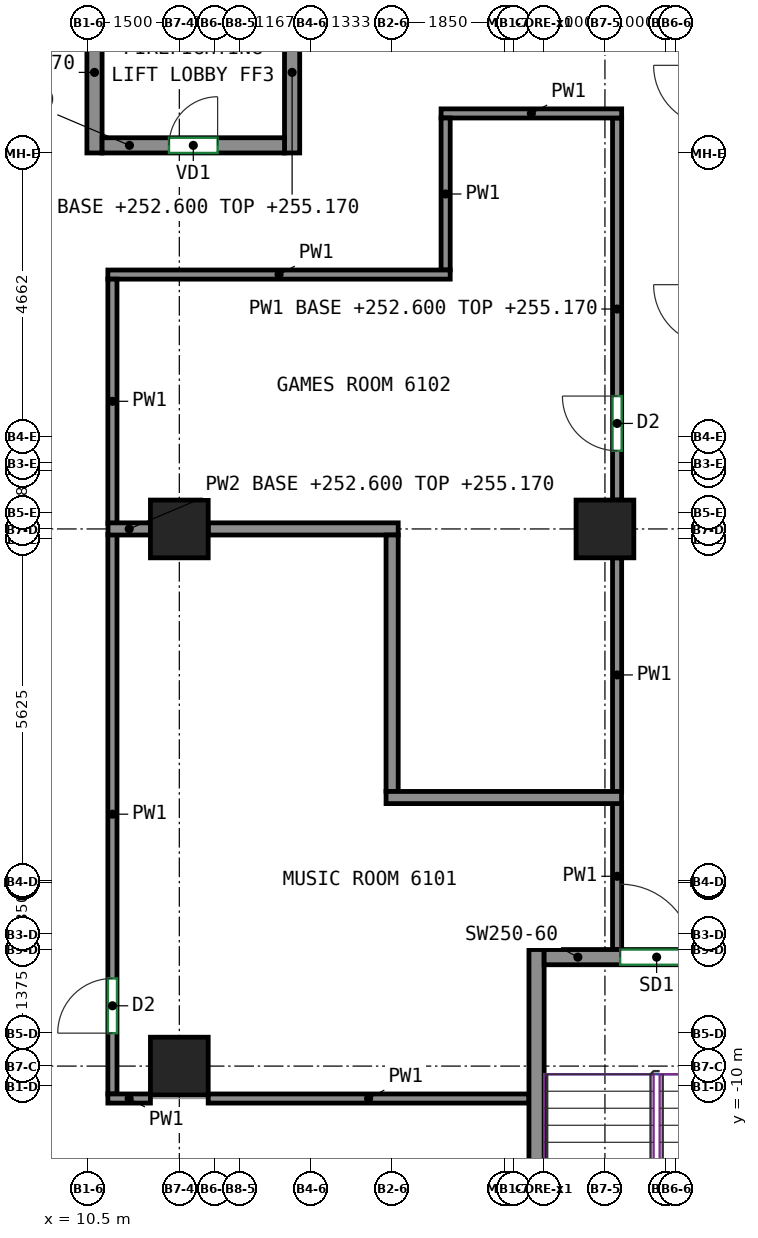
"""IFC4 building model, lengths in metres.
Left out: names, types, materials, properties, quantities, classifications, styles, units other than length and angle.
Written with IfcOpenShell. Run it as: python <this file> out.ifc"""

import sys

from ifc_helpers import new_model, si_unit, direction, frame, frame_2d, origin, origin_2d, place, context, subcontext, project, spatial, rectangle, extrude, source, transform, mapped, element, fill, save


model = new_model("IFC4")
c1 = context("Model", 3, precision=1e-05, world=origin(), true_north=direction((0.0, 1.0)))
c2 = subcontext(c1, "Body", "Model", "MODEL_VIEW")
j1 = project(units=[si_unit("LENGTHUNIT", "METRE"), si_unit("PLANEANGLEUNIT", "RADIAN")], contexts=[c1])
p1 = place(None, origin())
s1 = spatial("IfcSite", under=j1, at=p1, CompositionType="ELEMENT")
p2 = place(p1, origin())
s2 = spatial("IfcBuilding", under=s1, at=p2, CompositionType="ELEMENT")
p3 = place(p2, frame((0.0, 0.0, 252.6)))
s3 = spatial("IfcBuildingStorey", under=s2, at=p3, CompositionType="ELEMENT", Elevation=252.6)
m1 = source(origin(), c2, "Body", "SweptSolid", [
    extrude(rectangle(XDim=0.95, YDim=0.95, at=origin_2d()), origin(), (0.0, 0.0, 1.0), 3.12),
])
for number, where, z_axis, x_axis in (
    (1, (12.0, -9.667, 0.0), (0.0, 0.0, 1.0), (1.0, 0.0, 0.0)),
    (2, (12.0, -0.833, 0.0), (0.0, 0.0, 1.0), (1.0, 0.0, 0.0)),
    (3, (19.0, -0.833, 0.0), (0.0, 0.0, 1.0), (1.0, 0.0, 0.0)),
):
    element("IfcColumn", number, at=place(p3, frame(where, z_axis=z_axis, x_axis=x_axis)), inside=s3, PredefinedType="COLUMN", context=c2, shape_type="MappedRepresentation", body=[
        mapped(m1, transform((0.0, 0.0, 0.0))),
    ])
m2 = source(origin(), c2, "Body", "SweptSolid", [
    extrude(rectangle(XDim=8.0, YDim=0.25, at=frame_2d((4.0, 0.0))), origin(), (0.0, 0.0, 1.0), 3.12),
])
p4 = place(p3, frame((17.875, -15.75, 0.0), z_axis=(0.0, 0.0, 1.0), x_axis=(0.0, 1.0, 0.0)))
e4 = element("IfcWall", 4, at=p4, inside=s3, PredefinedType="SHEAR", context=c2, shape_type="MappedRepresentation", body=[
    mapped(m2, transform((0.0, 0.0, 0.0))),
])
m3 = source(origin(), c2, "Body", "SweptSolid", [
    extrude(rectangle(XDim=3.7, YDim=0.25, at=frame_2d((1.85, 0.0))), origin(), (0.0, 0.0, 1.0), 3.12),
])
p5 = place(p3, frame((18.0, -7.875, 0.0), z_axis=(0.0, 0.0, 1.0), x_axis=(1.0, 0.0, 0.0)))
e5 = element("IfcWall", 5, at=p5, inside=s3, PredefinedType="SHEAR", context=c2, shape_type="MappedRepresentation", body=[
    mapped(m3, transform((0.0, 0.0, 0.0))),
])
p6 = place(p5, frame((1.25, 0.0, 0.0)))
e6 = element("IfcOpeningElement", 6, at=p6, cuts=e5, PredefinedType="OPENING", context=c2, shape_type="SweptSolid", body=[
    extrude(rectangle(XDim=1.2, YDim=2.1, at=frame_2d((0.6, 1.05))), frame((0.0, 0.135, 0.0), z_axis=(0.0, -1.0, 0.0), x_axis=(1.0, 0.0, 0.0)), (0.0, 0.0, 1.0), 0.27),
])
m4 = source(origin(), c2, "Body", "SweptSolid", [
    extrude(rectangle(XDim=2.65, YDim=0.25, at=frame_2d((1.325, 0.0))), origin(), (0.0, 0.0, 1.0), 2.57),
])
for number, where, z_axis, x_axis in (
    (7, (10.605, 5.35, 0.0), (0.0, 0.0, 1.0), (0.0, 1.0, 0.0)),
    (8, (13.855, 5.35, 0.0), (0.0, 0.0, 1.0), (0.0, 1.0, 0.0)),
):
    element("IfcWall", number, at=place(p3, frame(where, z_axis=z_axis, x_axis=x_axis)), inside=s3, PredefinedType="PARTITIONING", context=c2, shape_type="MappedRepresentation", body=[
        mapped(m4, transform((0.0, 0.0, 0.0))),
    ])
m5 = source(origin(), c2, "Body", "SweptSolid", [
    extrude(rectangle(XDim=3.0, YDim=0.25, at=frame_2d((1.5, 0.0))), origin(), (0.0, 0.0, 1.0), 3.12),
])
p7 = place(p3, frame((10.73, 5.475, 0.0), z_axis=(0.0, 0.0, 1.0), x_axis=(1.0, 0.0, 0.0)))
e9 = element("IfcWall", 9, at=p7, inside=s3, PredefinedType="PARTITIONING", context=c2, shape_type="MappedRepresentation", body=[
    mapped(m5, transform((0.0, 0.0, 0.0))),
])
p8 = place(p7, frame((1.1, 0.0, 0.0)))
e10 = element("IfcOpeningElement", 10, at=p8, cuts=e9, PredefinedType="OPENING", context=c2, shape_type="SweptSolid", body=[
    extrude(rectangle(XDim=0.8, YDim=2.0, at=frame_2d((0.4, 1.0))), frame((0.0, 0.135, 0.0), z_axis=(0.0, -1.0, 0.0), x_axis=(1.0, 0.0, 0.0)), (0.0, 0.0, 1.0), 0.27),
])
p9 = place(p3, frame((19.2, -7.75, 0.0), z_axis=(0.0, 0.0, 1.0), x_axis=(0.0, 1.0, 0.0)))
e11 = element("IfcWall", 11, at=p9, inside=s3, PredefinedType="PARTITIONING", context=c2, shape_type="SweptSolid", body=[
    extrude(rectangle(XDim=2.41, YDim=0.15, at=frame_2d((1.205, 0.0))), origin(), (0.0, 0.0, 1.0), 3.12),
])
p10 = place(p3, frame((10.9, -10.125, 0.0), z_axis=(0.0, 0.0, 1.0), x_axis=(0.0, 1.0, 0.0)))
e12 = element("IfcWall", 12, at=p10, inside=s3, PredefinedType="PARTITIONING", context=c2, shape_type="SweptSolid", body=[
    extrude(rectangle(XDim=9.202, YDim=0.15, at=frame_2d((4.601, 0.0))), origin(), (0.0, 0.0, 1.0), 3.12),
])
p11 = place(p10, frame((1.0, 0.0, 0.0)))
e13 = element("IfcOpeningElement", 13, at=p11, cuts=e12, PredefinedType="OPENING", context=c2, shape_type="SweptSolid", body=[
    extrude(rectangle(XDim=0.9, YDim=2.1, at=frame_2d((0.45, 1.05))), frame((0.0, 0.085, 0.0), z_axis=(0.0, -1.0, 0.0), x_axis=(1.0, 0.0, 0.0)), (0.0, 0.0, 1.0), 0.17),
])
p12 = place(p3, frame((12.475, -10.2, 0.0), z_axis=(0.0, 0.0, 1.0), x_axis=(1.0, 0.0, 0.0)))
e14 = element("IfcWall", 14, at=p12, inside=s3, PredefinedType="PARTITIONING", context=c2, shape_type="SweptSolid", body=[
    extrude(rectangle(XDim=5.275, YDim=0.15, at=frame_2d((2.637, 0.0))), origin(), (0.0, 0.0, 1.0), 3.12),
])
p13 = place(p3, frame((10.825, -10.2, 0.0), z_axis=(0.0, 0.0, 1.0), x_axis=(1.0, 0.0, 0.0)))
e15 = element("IfcWall", 15, at=p13, inside=s3, PredefinedType="PARTITIONING", context=c2, shape_type="SweptSolid", body=[
    extrude(rectangle(XDim=0.7, YDim=0.15, at=frame_2d((0.35, 0.0))), origin(), (0.0, 0.0, 1.0), 3.12),
])
p14 = place(p3, frame((19.2, -5.16, 0.0), z_axis=(0.0, 0.0, 1.0), x_axis=(0.0, 1.0, 0.0)))
e16 = element("IfcWall", 16, at=p14, inside=s3, PredefinedType="PARTITIONING", context=c2, shape_type="SweptSolid", body=[
    extrude(rectangle(XDim=3.852, YDim=0.15, at=frame_2d((1.926, 0.0))), origin(), (0.0, 0.0, 1.0), 3.12),
])
p15 = place(p3, frame((19.2, -0.358, 0.0), z_axis=(0.0, 0.0, 1.0), x_axis=(0.0, 1.0, 0.0)))
e17 = element("IfcWall", 17, at=p15, inside=s3, PredefinedType="PARTITIONING", context=c2, shape_type="SweptSolid", body=[
    extrude(rectangle(XDim=6.283, YDim=0.15, at=frame_2d((3.142, 0.0))), origin(), (0.0, 0.0, 1.0), 2.57),
])
p16 = place(p15, frame((0.81, 0.0, 0.0)))
e18 = element("IfcOpeningElement", 18, at=p16, cuts=e17, PredefinedType="OPENING", context=c2, shape_type="SweptSolid", body=[
    extrude(rectangle(XDim=0.9, YDim=2.1, at=frame_2d((0.45, 1.05))), frame((0.0, 0.085, 0.0), z_axis=(0.0, -1.0, 0.0), x_axis=(1.0, 0.0, 0.0)), (0.0, 0.0, 1.0), 0.17),
])
p17 = place(p3, frame((16.305, 6.0, 0.0), z_axis=(0.0, 0.0, 1.0), x_axis=(1.0, 0.0, 0.0)))
e19 = element("IfcWall", 19, at=p17, inside=s3, PredefinedType="PARTITIONING", context=c2, shape_type="SweptSolid", body=[
    extrude(rectangle(XDim=2.97, YDim=0.15, at=frame_2d((1.485, 0.0))), origin(), (0.0, 0.0, 1.0), 3.12),
])
p18 = place(p3, frame((16.38, 3.425, 0.0), z_axis=(0.0, 0.0, 1.0), x_axis=(0.0, 1.0, 0.0)))
e20 = element("IfcWall", 20, at=p18, inside=s3, PredefinedType="PARTITIONING", context=c2, shape_type="SweptSolid", body=[
    extrude(rectangle(XDim=2.5, YDim=0.15, at=frame_2d((1.25, 0.0))), origin(), (0.0, 0.0, 1.0), 3.12),
])
p19 = place(p3, frame((10.825, 3.35, 0.0), z_axis=(0.0, 0.0, 1.0), x_axis=(1.0, 0.0, 0.0)))
e21 = element("IfcWall", 21, at=p19, inside=s3, PredefinedType="PARTITIONING", context=c2, shape_type="SweptSolid", body=[
    extrude(rectangle(XDim=5.63, YDim=0.15, at=frame_2d((2.815, 0.0))), origin(), (0.0, 0.0, 1.0), 3.12),
])
p20 = place(p3, frame((10.9, -0.743, 0.0), z_axis=(0.0, 0.0, 1.0), x_axis=(0.0, 1.0, 0.0)))
e22 = element("IfcWall", 22, at=p20, inside=s3, PredefinedType="PARTITIONING", context=c2, shape_type="SweptSolid", body=[
    extrude(rectangle(XDim=4.018, YDim=0.15, at=frame_2d((2.009, 0.0))), origin(), (0.0, 0.0, 1.0), 3.12),
])
p21 = place(p3, frame((10.827, -0.833, 0.0), z_axis=(0.0, 0.0, 1.0), x_axis=(1.0, 0.0, 0.0)))
e23 = element("IfcWall", 23, at=p21, inside=s3, PredefinedType="PARTITIONING", context=c2, shape_type="SweptSolid", body=[
    extrude(rectangle(XDim=0.698, YDim=0.2, at=frame_2d((0.349, 0.0))), origin(), (0.0, 0.0, 1.0), 2.57),
])
p22 = place(p3, frame((12.475, -0.833, 0.0), z_axis=(0.0, 0.0, 1.0), x_axis=(1.0, 0.0, 0.0)))
e24 = element("IfcWall", 24, at=p22, inside=s3, PredefinedType="PARTITIONING", context=c2, shape_type="SweptSolid", body=[
    extrude(rectangle(XDim=3.125, YDim=0.2, at=frame_2d((1.562, 0.0))), origin(), (0.0, 0.0, 1.0), 3.12),
])
p23 = place(p3, frame((15.5, -5.15, 0.0), z_axis=(0.0, 0.0, 1.0), x_axis=(0.0, 1.0, 0.0)))
e25 = element("IfcWall", 25, at=p23, inside=s3, PredefinedType="PARTITIONING", context=c2, shape_type="SweptSolid", body=[
    extrude(rectangle(XDim=4.217, YDim=0.2, at=frame_2d((2.108, 0.0))), origin(), (0.0, 0.0, 1.0), 3.12),
])
p24 = place(p3, frame((15.4, -5.25, 0.0), z_axis=(0.0, 0.0, 1.0), x_axis=(1.0, 0.0, 0.0)))
e26 = element("IfcWall", 26, at=p24, inside=s3, PredefinedType="PARTITIONING", context=c2, shape_type="SweptSolid", body=[
    extrude(rectangle(XDim=3.873, YDim=0.2, at=frame_2d((1.937, 0.0))), origin(), (0.0, 0.0, 1.0), 3.12),
])
p25 = place(p8, origin())
e27 = element("IfcDoor", 27, at=p25, inside=s3, OperationType="SINGLE_SWING_RIGHT", PredefinedType="DOOR", context=c2, shape_type="SweptSolid", body=[
    extrude(rectangle(XDim=0.8, YDim=2.0, at=frame_2d((0.4, 1.0))), frame((0.0, 0.025, 0.0), z_axis=(0.0, -1.0, 0.0), x_axis=(1.0, 0.0, 0.0)), (0.0, 0.0, 1.0), 0.05),
])
fill(e10, e27)
p26 = place(p6, origin())
e28 = element("IfcDoor", 28, at=p26, inside=s3, OperationType="DOUBLE_DOOR_SINGLE_SWING", PredefinedType="DOOR", context=c2, shape_type="SweptSolid", body=[
    extrude(rectangle(XDim=1.2, YDim=2.1, at=frame_2d((0.6, 1.05))), frame((0.0, 0.025, 0.0), z_axis=(0.0, -1.0, 0.0), x_axis=(1.0, 0.0, 0.0)), (0.0, 0.0, 1.0), 0.05),
])
fill(e6, e28)
p27 = place(p11, origin())
e29 = element("IfcDoor", 29, at=p27, inside=s3, OperationType="SINGLE_SWING_LEFT", PredefinedType="DOOR", context=c2, shape_type="SweptSolid", body=[
    extrude(rectangle(XDim=0.9, YDim=2.1, at=frame_2d((0.45, 1.05))), frame((0.0, 0.025, 0.0), z_axis=(0.0, -1.0, 0.0), x_axis=(1.0, 0.0, 0.0)), (0.0, 0.0, 1.0), 0.05),
])
fill(e13, e29)
p28 = place(p16, origin())
e30 = element("IfcDoor", 30, at=p28, inside=s3, OperationType="SINGLE_SWING_RIGHT", PredefinedType="DOOR", context=c2, shape_type="SweptSolid", body=[
    extrude(rectangle(XDim=0.9, YDim=2.1, at=frame_2d((0.45, 1.05))), frame((0.0, 0.025, 0.0), z_axis=(0.0, -1.0, 0.0), x_axis=(1.0, 0.0, 0.0)), (0.0, 0.0, 1.0), 0.05),
])
fill(e18, e30)
save(model, sys.argv[1])
